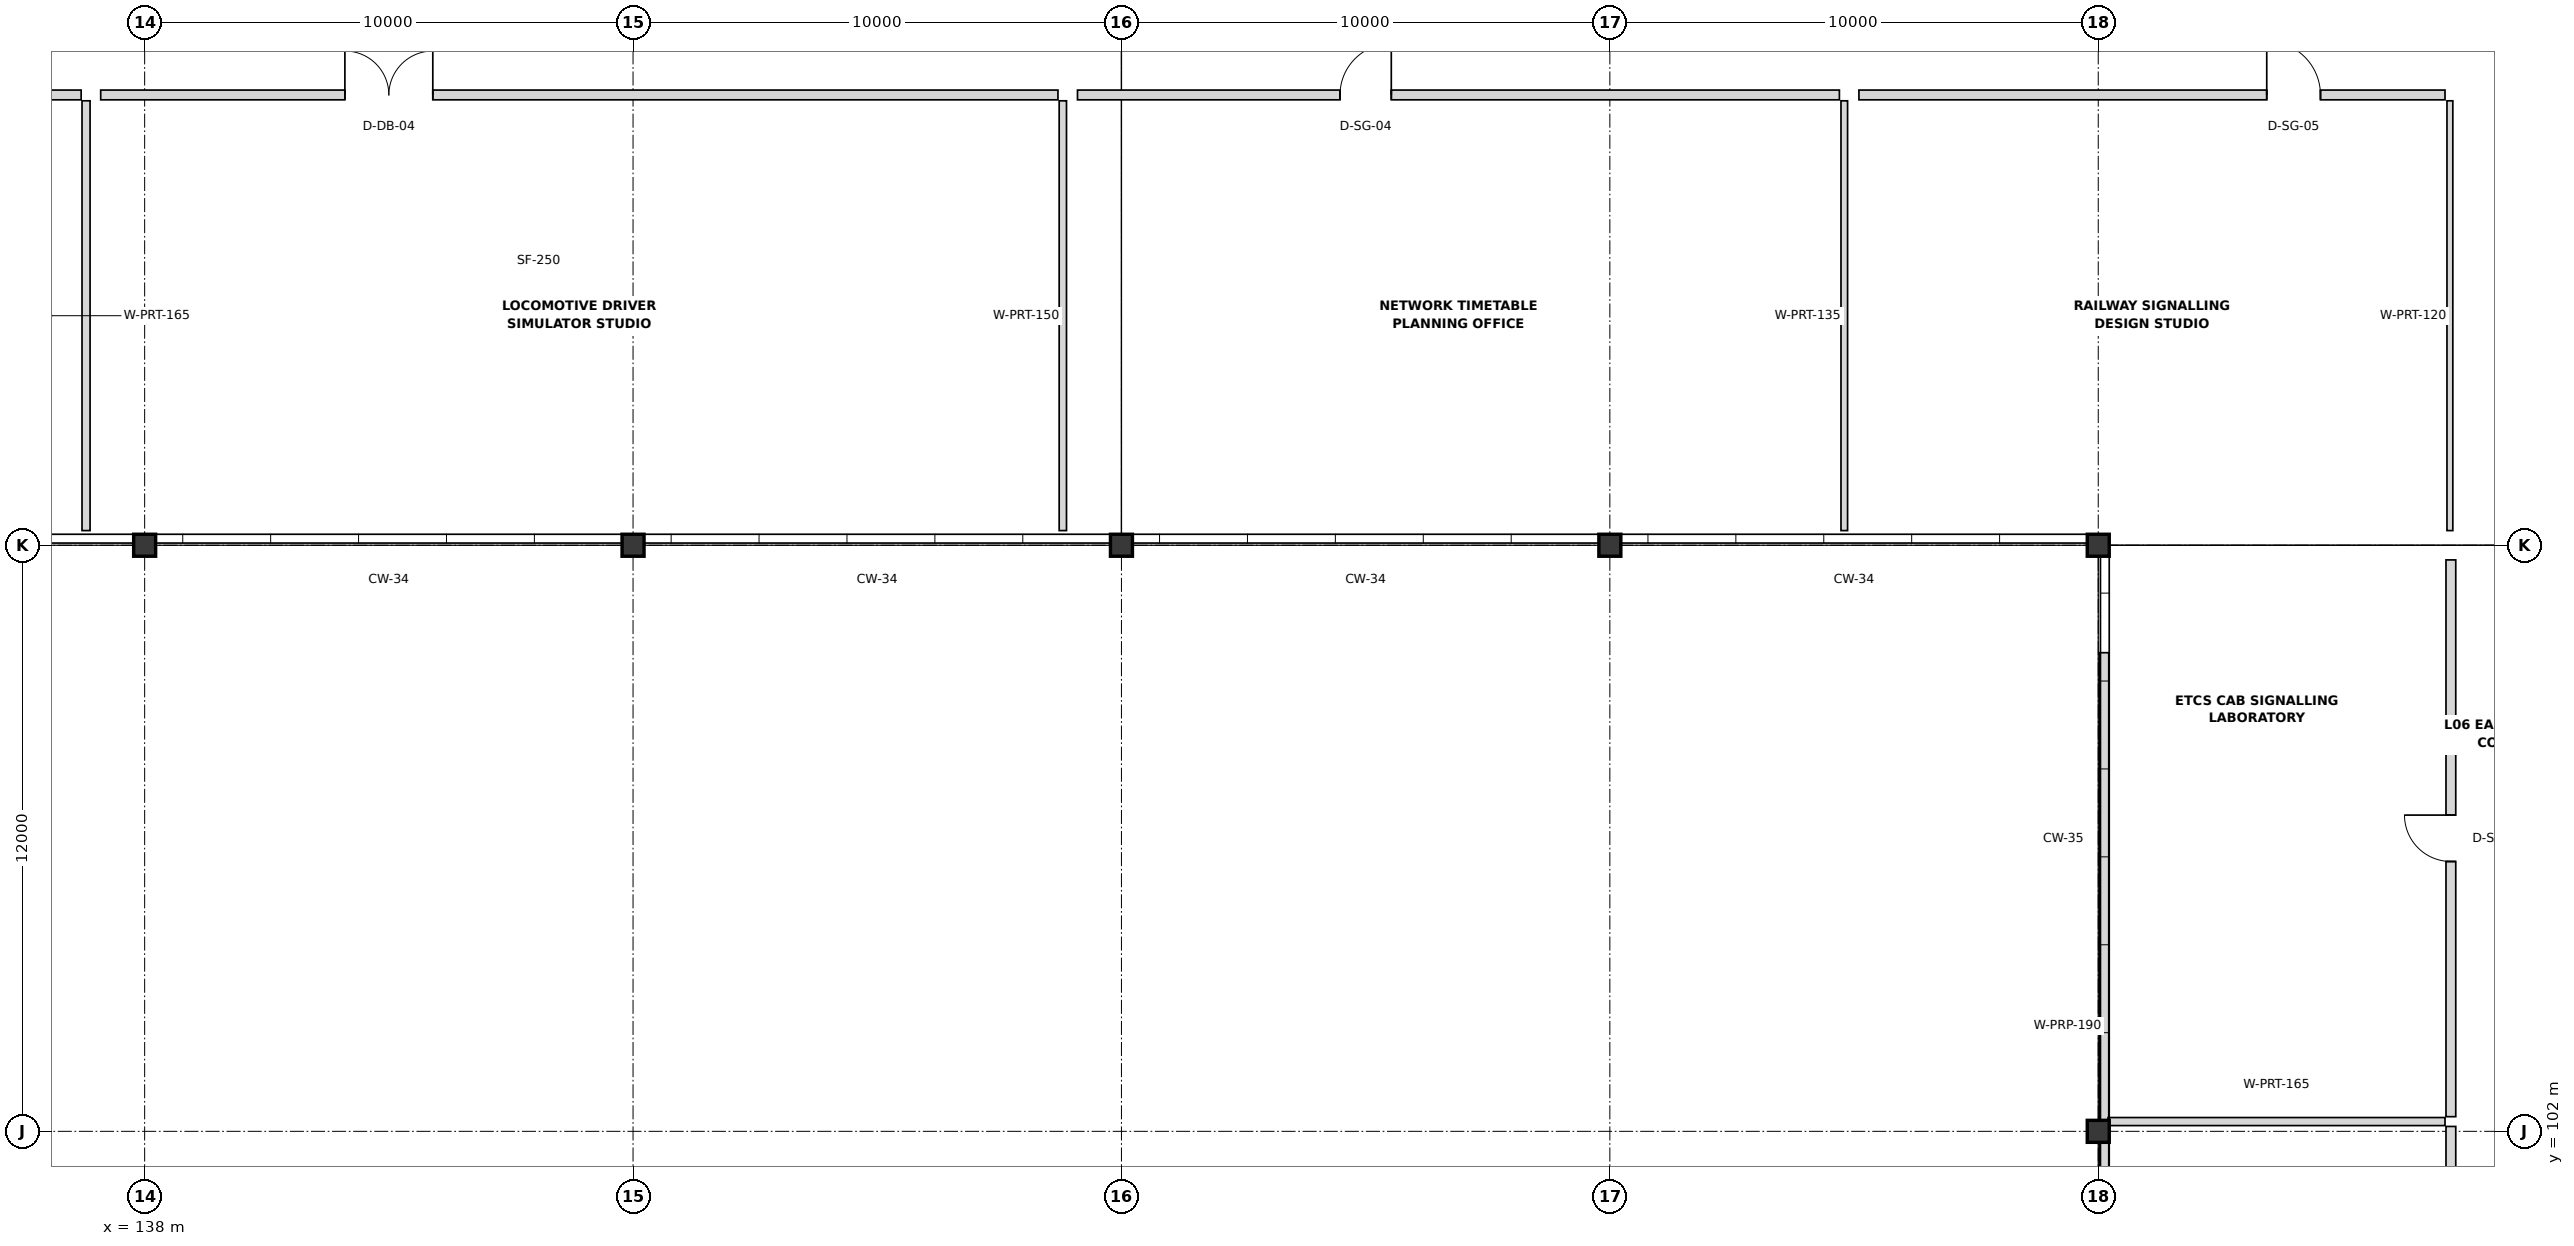
"""IFC4 building model, lengths in metres.
Left out: names, types, materials, properties, quantities, classifications, styles, units other than length and angle.
Written with IfcOpenShell. Run it as: python <this file> out.ifc"""

import sys

from ifc_helpers import new_model, si_unit, direction, frame, frame_2d, origin, origin_2d, place, context, subcontext, project, spatial, rectangle, extrude, element, fill, save


model = new_model("IFC4")
c1 = context("Model", 3, precision=1e-05, world=origin(), true_north=direction((0.0, 1.0)))
c2 = subcontext(c1, "Body", "Model", "MODEL_VIEW")
j1 = project(units=[si_unit("LENGTHUNIT", "METRE"), si_unit("PLANEANGLEUNIT", "RADIAN")], contexts=[c1])
p1 = place(None, origin())
s1 = spatial("IfcSite", under=j1, at=p1, CompositionType="ELEMENT")
p2 = place(p1, origin())
s2 = spatial("IfcBuilding", under=s1, at=p2, CompositionType="ELEMENT")
p3 = place(p2, frame((0.0, 0.0, 27.0)))
s3 = spatial("IfcBuildingStorey", under=s2, at=p3, CompositionType="ELEMENT", Elevation=27.0)
for number, where, z_axis, x_axis in (
    (1, (138.0, 114.0, 0.0), (0.0, 0.0, 1.0), (1.0, 0.0, 0.0)),
    (2, (148.0, 114.0, 0.0), (0.0, 0.0, 1.0), (1.0, 0.0, 0.0)),
    (3, (158.0, 114.0, 0.0), (0.0, 0.0, 1.0), (1.0, 0.0, 0.0)),
    (4, (168.0, 114.0, 0.0), (0.0, 0.0, 1.0), (1.0, 0.0, 0.0)),
    (5, (178.0, 102.0, 0.0), (0.0, 0.0, 1.0), (1.0, 0.0, 0.0)),
    (6, (178.0, 114.0, 0.0), (0.0, 0.0, 1.0), (1.0, 0.0, 0.0)),
):
    element("IfcColumn", number, at=place(p3, frame(where, z_axis=z_axis, x_axis=x_axis)), inside=s3, PredefinedType="COLUMN", context=c2, shape_type="SweptSolid", body=[
        extrude(rectangle(XDim=0.45, YDim=0.45, at=origin_2d()), origin(), (0.0, 0.0, 1.0), 4.2),
    ])
p4 = place(p3, frame((178.12, 90.12, 4.2), z_axis=(0.0, 0.0, 1.0), x_axis=(0.0, 1.0, 0.0)))
e7 = element("IfcWall", 7, at=p4, inside=s3, PredefinedType="PARAPET", context=c2, shape_type="SweptSolid", body=[
    extrude(rectangle(XDim=21.68, YDim=0.19, at=frame_2d((10.84, 0.0))), origin(), (0.0, 0.0, 1.0), 0.95),
])
p5 = place(p3, frame((118.4, 123.22, 0.0), z_axis=(0.0, 0.0, 1.0), x_axis=(1.0, 0.0, 0.0)))
e8 = element("IfcWall", 8, at=p5, inside=s3, PredefinedType="PARTITIONING", context=c2, shape_type="SweptSolid", body=[
    extrude(rectangle(XDim=18.3, YDim=0.2, at=frame_2d((9.15, 0.0))), origin(), (0.0, 0.0, 1.0), 3.218),
])
p6 = place(p5, frame((3.75, 0.0, 0.0)))
e9 = element("IfcOpeningElement", 9, at=p6, cuts=e8, PredefinedType="OPENING", context=c2, shape_type="SweptSolid", body=[
    extrude(rectangle(XDim=1.7, YDim=2.2, at=frame_2d((0.85, 1.1))), frame((0.0, 0.11, 0.0), z_axis=(0.0, -1.0, 0.0), x_axis=(1.0, 0.0, 0.0)), (0.0, 0.0, 1.0), 0.22),
])
p7 = place(p3, frame((136.8, 114.3, 0.0), z_axis=(0.0, 0.0, 1.0), x_axis=(0.0, 1.0, 0.0)))
e10 = element("IfcWall", 10, at=p7, inside=s3, PredefinedType="PARTITIONING", context=c2, shape_type="SweptSolid", body=[
    extrude(rectangle(XDim=8.8, YDim=0.165, at=frame_2d((4.4, 0.0))), origin(), (0.0, 0.0, 1.0), 3.318),
])
p8 = place(p3, frame((137.1, 123.22, 0.0), z_axis=(0.0, 0.0, 1.0), x_axis=(1.0, 0.0, 0.0)))
e11 = element("IfcWall", 11, at=p8, inside=s3, PredefinedType="PARTITIONING", context=c2, shape_type="SweptSolid", body=[
    extrude(rectangle(XDim=19.6, YDim=0.2, at=frame_2d((9.8, 0.0))), origin(), (0.0, 0.0, 1.0), 3.218),
])
p9 = place(p8, frame((5.0, 0.0, 0.0)))
e12 = element("IfcOpeningElement", 12, at=p9, cuts=e11, PredefinedType="OPENING", context=c2, shape_type="SweptSolid", body=[
    extrude(rectangle(XDim=1.8, YDim=2.2, at=frame_2d((0.9, 1.1))), frame((0.0, 0.11, 0.0), z_axis=(0.0, -1.0, 0.0), x_axis=(1.0, 0.0, 0.0)), (0.0, 0.0, 1.0), 0.22),
])
p10 = place(p3, frame((156.8, 114.3, 0.0), z_axis=(0.0, 0.0, 1.0), x_axis=(0.0, 1.0, 0.0)))
e13 = element("IfcWall", 13, at=p10, inside=s3, PredefinedType="PARTITIONING", context=c2, shape_type="SweptSolid", body=[
    extrude(rectangle(XDim=8.8, YDim=0.15, at=frame_2d((4.4, 0.0))), origin(), (0.0, 0.0, 1.0), 3.318),
])
p11 = place(p3, frame((157.1, 123.22, 0.0), z_axis=(0.0, 0.0, 1.0), x_axis=(1.0, 0.0, 0.0)))
e14 = element("IfcWall", 14, at=p11, inside=s3, PredefinedType="PARTITIONING", context=c2, shape_type="SweptSolid", body=[
    extrude(rectangle(XDim=15.6, YDim=0.2, at=frame_2d((7.8, 0.0))), origin(), (0.0, 0.0, 1.0), 3.218),
])
p12 = place(p11, frame((5.375, 0.0, 0.0)))
e15 = element("IfcOpeningElement", 15, at=p12, cuts=e14, PredefinedType="OPENING", context=c2, shape_type="SweptSolid", body=[
    extrude(rectangle(XDim=1.05, YDim=2.1, at=frame_2d((0.525, 1.05))), frame((0.0, 0.11, 0.0), z_axis=(0.0, -1.0, 0.0), x_axis=(1.0, 0.0, 0.0)), (0.0, 0.0, 1.0), 0.22),
])
p13 = place(p3, frame((172.8, 114.3, 0.0), z_axis=(0.0, 0.0, 1.0), x_axis=(0.0, 1.0, 0.0)))
e16 = element("IfcWall", 16, at=p13, inside=s3, PredefinedType="PARTITIONING", context=c2, shape_type="SweptSolid", body=[
    extrude(rectangle(XDim=8.8, YDim=0.135, at=frame_2d((4.4, 0.0))), origin(), (0.0, 0.0, 1.0), 3.318),
])
p14 = place(p3, frame((173.1, 123.22, 0.0), z_axis=(0.0, 0.0, 1.0), x_axis=(1.0, 0.0, 0.0)))
e17 = element("IfcWall", 17, at=p14, inside=s3, PredefinedType="PARTITIONING", context=c2, shape_type="SweptSolid", body=[
    extrude(rectangle(XDim=12.0, YDim=0.2, at=frame_2d((6.0, 0.0))), origin(), (0.0, 0.0, 1.0), 3.218),
])
p15 = place(p14, frame((8.35, 0.0, 0.0)))
e18 = element("IfcOpeningElement", 18, at=p15, cuts=e17, PredefinedType="OPENING", context=c2, shape_type="SweptSolid", body=[
    extrude(rectangle(XDim=1.1, YDim=2.1, at=frame_2d((0.55, 1.05))), frame((0.0, 0.11, 0.0), z_axis=(0.0, -1.0, 0.0), x_axis=(1.0, 0.0, 0.0)), (0.0, 0.0, 1.0), 0.22),
])
p16 = place(p3, frame((185.2, 114.3, 0.0), z_axis=(0.0, 0.0, 1.0), x_axis=(0.0, 1.0, 0.0)))
e19 = element("IfcWall", 19, at=p16, inside=s3, PredefinedType="PARTITIONING", context=c2, shape_type="SweptSolid", body=[
    extrude(rectangle(XDim=8.8, YDim=0.12, at=frame_2d((4.4, 0.0))), origin(), (0.0, 0.0, 1.0), 3.318),
])
p17 = place(p3, frame((185.22, 90.4, 0.0), z_axis=(0.0, 0.0, 1.0), x_axis=(0.0, 1.0, 0.0)))
e20 = element("IfcWall", 20, at=p17, inside=s3, PredefinedType="PARTITIONING", context=c2, shape_type="SweptSolid", body=[
    extrude(rectangle(XDim=11.7, YDim=0.2, at=frame_2d((5.85, 0.0))), origin(), (0.0, 0.0, 1.0), 3.318),
])
p18 = place(p17, frame((5.15, 0.0, 0.0)))
e21 = element("IfcOpeningElement", 21, at=p18, cuts=e20, PredefinedType="OPENING", context=c2, shape_type="SweptSolid", body=[
    extrude(rectangle(XDim=0.9, YDim=2.2, at=frame_2d((0.45, 1.1))), frame((0.0, 0.11, 0.0), z_axis=(0.0, -1.0, 0.0), x_axis=(1.0, 0.0, 0.0)), (0.0, 0.0, 1.0), 0.22),
])
p19 = place(p3, frame((178.2, 102.2, 0.0), z_axis=(0.0, 0.0, 1.0), x_axis=(1.0, 0.0, 0.0)))
e22 = element("IfcWall", 22, at=p19, inside=s3, PredefinedType="PARTITIONING", context=c2, shape_type="SweptSolid", body=[
    extrude(rectangle(XDim=6.9, YDim=0.165, at=frame_2d((3.45, 0.0))), origin(), (0.0, 0.0, 1.0), 3.218),
])
p20 = place(p3, frame((185.22, 102.3, 0.0), z_axis=(0.0, 0.0, 1.0), x_axis=(0.0, 1.0, 0.0)))
e23 = element("IfcWall", 23, at=p20, inside=s3, PredefinedType="PARTITIONING", context=c2, shape_type="SweptSolid", body=[
    extrude(rectangle(XDim=11.4, YDim=0.2, at=frame_2d((5.7, 0.0))), origin(), (0.0, 0.0, 1.0), 3.318),
])
p21 = place(p20, frame((5.225, 0.0, 0.0)))
e24 = element("IfcOpeningElement", 24, at=p21, cuts=e23, PredefinedType="OPENING", context=c2, shape_type="SweptSolid", body=[
    extrude(rectangle(XDim=0.95, YDim=2.2, at=frame_2d((0.475, 1.1))), frame((0.0, 0.11, 0.0), z_axis=(0.0, -1.0, 0.0), x_axis=(1.0, 0.0, 0.0)), (0.0, 0.0, 1.0), 0.22),
])
p22 = place(p9, origin())
e25 = element("IfcDoor", 25, at=p22, inside=s3, OperationType="DOUBLE_DOOR_SINGLE_SWING", PredefinedType="DOOR", context=c2, shape_type="SweptSolid", body=[
    extrude(rectangle(XDim=1.8, YDim=2.2, at=frame_2d((0.9, 1.1))), frame((0.0, 0.025, 0.0), z_axis=(0.0, -1.0, 0.0), x_axis=(1.0, 0.0, 0.0)), (0.0, 0.0, 1.0), 0.05),
])
fill(e12, e25)
p23 = place(p12, origin())
e26 = element("IfcDoor", 26, at=p23, inside=s3, OperationType="SINGLE_SWING_RIGHT", PredefinedType="DOOR", context=c2, shape_type="SweptSolid", body=[
    extrude(rectangle(XDim=1.05, YDim=2.1, at=frame_2d((0.525, 1.05))), frame((0.0, 0.025, 0.0), z_axis=(0.0, -1.0, 0.0), x_axis=(1.0, 0.0, 0.0)), (0.0, 0.0, 1.0), 0.05),
])
fill(e15, e26)
p24 = place(p15, origin())
e27 = element("IfcDoor", 27, at=p24, inside=s3, OperationType="SINGLE_SWING_LEFT", PredefinedType="DOOR", context=c2, shape_type="SweptSolid", body=[
    extrude(rectangle(XDim=1.1, YDim=2.1, at=frame_2d((0.55, 1.05))), frame((0.0, 0.025, 0.0), z_axis=(0.0, -1.0, 0.0), x_axis=(1.0, 0.0, 0.0)), (0.0, 0.0, 1.0), 0.05),
])
fill(e18, e27)
p25 = place(p21, origin())
e28 = element("IfcDoor", 28, at=p25, inside=s3, OperationType="SINGLE_SWING_RIGHT", PredefinedType="DOOR", context=c2, shape_type="SweptSolid", body=[
    extrude(rectangle(XDim=0.95, YDim=2.2, at=frame_2d((0.475, 1.1))), frame((0.0, 0.025, 0.0), z_axis=(0.0, -1.0, 0.0), x_axis=(1.0, 0.0, 0.0)), (0.0, 0.0, 1.0), 0.05),
])
fill(e24, e28)
save(model, sys.argv[1])
